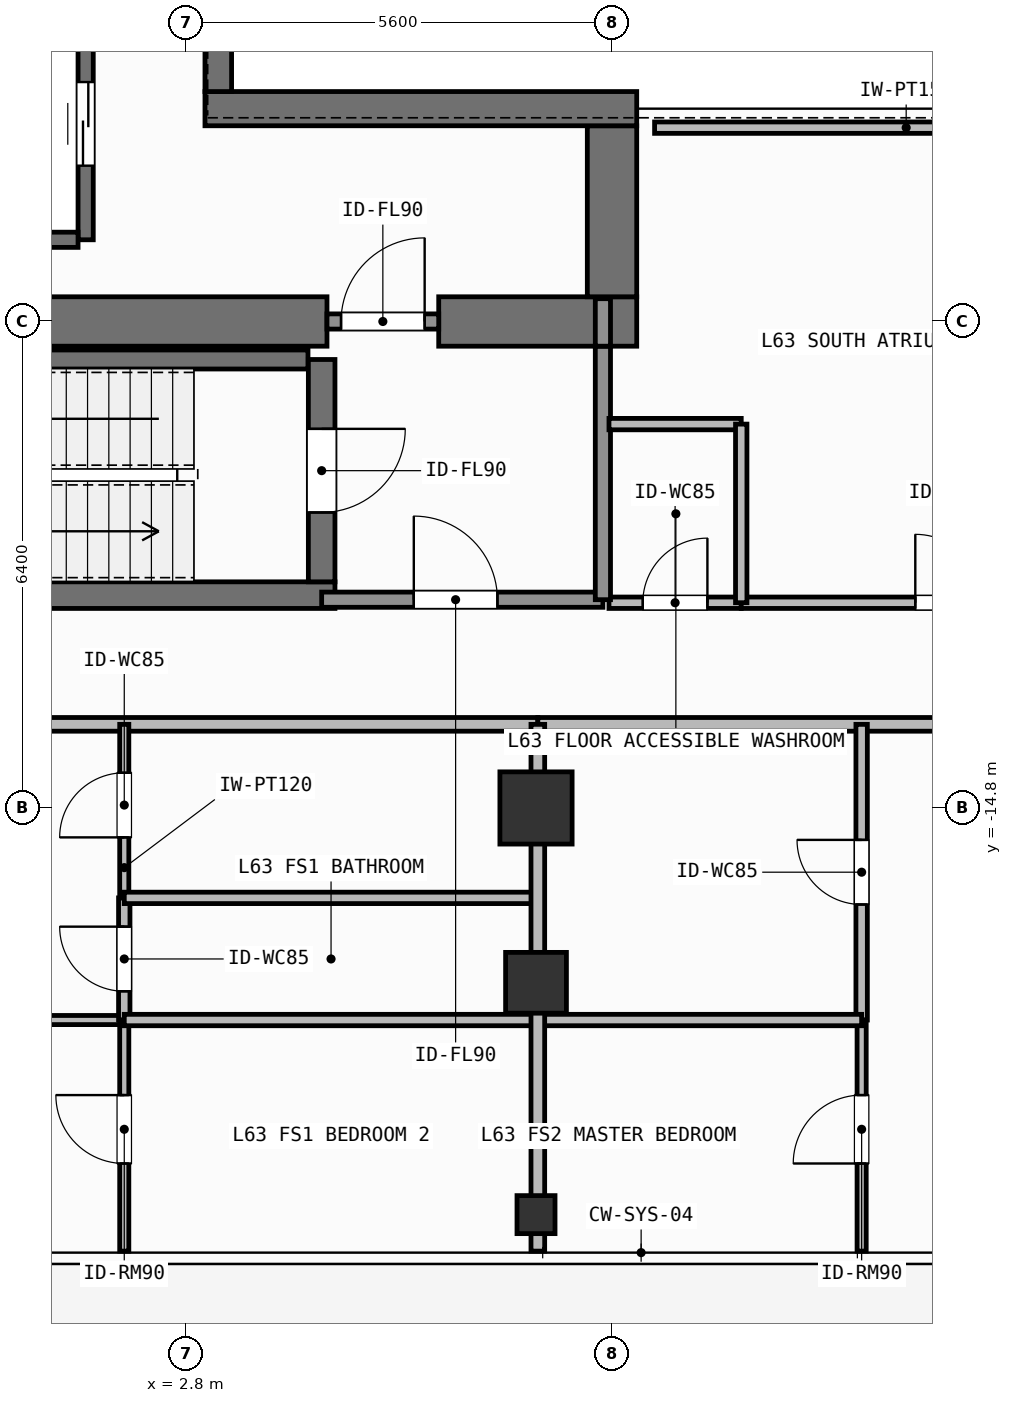
"""IFC4 building model, lengths in metres.
Left out: names, types, materials, properties, quantities, classifications, styles, units other than length and angle.
Written with IfcOpenShell. Run it as: python <this file> out.ifc"""

import sys

from ifc_helpers import new_model, si_unit, direction, frame, frame_2d, origin, origin_2d, place, context, subcontext, project, spatial, rectangle, hollow_rectangle, extrude, element, fill, save


model = new_model("IFC4")
c1 = context("Model", 3, precision=1e-05, world=origin(), true_north=direction((0.0, 1.0)))
c2 = subcontext(c1, "Body", "Model", "MODEL_VIEW")
j1 = project(units=[si_unit("LENGTHUNIT", "METRE"), si_unit("PLANEANGLEUNIT", "RADIAN")], contexts=[c1])
p1 = place(None, origin())
s1 = spatial("IfcSite", under=j1, at=p1, CompositionType="ELEMENT")
p2 = place(p1, origin())
s2 = spatial("IfcBuilding", under=s1, at=p2, CompositionType="ELEMENT")
p3 = place(p2, frame((0.0, 0.0, 258.6)))
s3 = spatial("IfcBuildingStorey", under=s2, at=p3, CompositionType="ELEMENT", Elevation=258.6)
p4 = place(p3, frame((-2.62, -8.4, 0.0), z_axis=(0.0, 0.0, 1.0), x_axis=(1.0, 0.0, 0.0)))
e1 = element("IfcWall", 1, at=p4, inside=s3, PredefinedType="SHEAR", context=c2, shape_type="SweptSolid", body=[
    extrude(rectangle(XDim=7.27, YDim=0.65, at=frame_2d((3.635, 0.0))), origin(), (0.0, 0.0, 1.0), 3.9),
])
p5 = place(p3, frame((6.12, -8.4, 0.0), z_axis=(0.0, 0.0, 1.0), x_axis=(1.0, 0.0, 0.0)))
e2 = element("IfcWall", 2, at=p5, inside=s3, PredefinedType="SHEAR", context=c2, shape_type="SweptSolid", body=[
    extrude(rectangle(XDim=2.605, YDim=0.65, at=frame_2d((1.302, 0.0))), origin(), (0.0, 0.0, 1.0), 3.9),
])
p6 = place(p3, frame((8.4, -8.075, 0.0), z_axis=(0.0, 0.0, 1.0), x_axis=(0.0, 1.0, 0.0)))
e3 = element("IfcWall", 3, at=p6, inside=s3, PredefinedType="SHEAR", context=c2, shape_type="SweptSolid", body=[
    extrude(rectangle(XDim=2.25, YDim=0.65, at=frame_2d((1.125, 0.0))), origin(), (0.0, 0.0, 1.0), 3.9),
])
p7 = place(p3, frame((3.045, -5.6, 0.0), z_axis=(0.0, 0.0, 1.0), x_axis=(1.0, 0.0, 0.0)))
e4 = element("IfcWall", 4, at=p7, inside=s3, PredefinedType="SHEAR", context=c2, shape_type="SweptSolid", body=[
    extrude(rectangle(XDim=5.68, YDim=0.45, at=frame_2d((2.84, 0.0))), origin(), (0.0, 0.0, 1.0), 3.9),
])
p8 = place(p3, frame((3.22, -5.375, 0.0), z_axis=(0.0, 0.0, 1.0), x_axis=(0.0, 1.0, 0.0)))
e5 = element("IfcWall", 5, at=p8, inside=s3, PredefinedType="SHEAR", context=c2, shape_type="SweptSolid", body=[
    extrude(rectangle(XDim=10.75, YDim=0.35, at=frame_2d((5.375, 0.0))), origin(), (0.0, 0.0, 1.0), 3.9),
])
p9 = place(p3, frame((-2.555, -12.0, 0.0), z_axis=(0.0, 0.0, 1.0), x_axis=(1.0, 0.0, 0.0)))
e6 = element("IfcWall", 6, at=p9, inside=s3, PredefinedType="SHEAR", context=c2, shape_type="SweptSolid", body=[
    extrude(rectangle(XDim=7.31, YDim=0.35, at=frame_2d((3.655, 0.0))), origin(), (0.0, 0.0, 1.0), 3.9),
])
p10 = place(p3, frame((-2.2, -8.9, 0.0), z_axis=(0.0, 0.0, 1.0), x_axis=(1.0, 0.0, 0.0)))
e7 = element("IfcWall", 7, at=p10, inside=s3, PredefinedType="SHEAR", context=c2, shape_type="SweptSolid", body=[
    extrude(rectangle(XDim=6.6, YDim=0.25, at=frame_2d((3.3, 0.0))), origin(), (0.0, 0.0, 1.0), 3.9),
])
p11 = place(p3, frame((4.58, -8.9, 0.0), z_axis=(0.0, 0.0, 1.0), x_axis=(0.0, -1.0, 0.0)))
e8 = element("IfcWall", 8, at=p11, inside=s3, PredefinedType="SHEAR", context=c2, shape_type="SweptSolid", body=[
    extrude(rectangle(XDim=2.925, YDim=0.35, at=frame_2d((1.462, 0.0))), origin(), (0.0, 0.0, 1.0), 3.9),
])
p12 = place(p11, frame((0.913, 0.0, 0.0)))
e9 = element("IfcOpeningElement", 9, at=p12, cuts=e8, PredefinedType="OPENING", context=c2, shape_type="SweptSolid", body=[
    extrude(rectangle(XDim=1.1, YDim=2.15, at=frame_2d((0.55, 1.075))), frame((0.0, 0.185, 0.0), z_axis=(0.0, -1.0, 0.0), x_axis=(1.0, 0.0, 0.0)), (0.0, 0.0, 1.0), 0.37),
])
p13 = place(p3, frame((7.4, -14.8, 0.0), z_axis=(0.0, 0.0, 1.0), x_axis=(1.0, 0.0, 0.0)))
e10 = element("IfcColumn", 10, at=p13, inside=s3, PredefinedType="COLUMN", context=c2, shape_type="SweptSolid", body=[
    extrude(rectangle(XDim=0.95, YDim=0.95, at=origin_2d()), origin(), (0.0, 0.0, 1.0), 3.9),
])
p14 = place(p3, frame((7.4, -17.1, 0.0), z_axis=(0.0, 0.0, 1.0), x_axis=(1.0, 0.0, 0.0)))
e11 = element("IfcColumn", 11, at=p14, inside=s3, PredefinedType="COLUMN", context=c2, shape_type="SweptSolid", body=[
    extrude(hollow_rectangle(XDim=0.8, YDim=0.8, WallThickness=0.036, at=origin_2d()), origin(), (0.0, 0.0, 1.0), 3.9),
])
p15 = place(p3, frame((7.4, -20.15, 0.0), z_axis=(0.0, 0.0, 1.0), x_axis=(1.0, 0.0, 0.0)))
e12 = element("IfcColumn", 12, at=p15, inside=s3, PredefinedType="COLUMN", context=c2, shape_type="SweptSolid", body=[
    extrude(hollow_rectangle(XDim=0.5, YDim=0.5, WallThickness=0.025, at=origin_2d()), origin(), (0.0, 0.0, 1.0), 3.9),
])
p16 = place(p3, frame((1.475, -7.325, 0.0), z_axis=(0.0, 0.0, 1.0), x_axis=(0.0, 1.0, 0.0)))
e13 = element("IfcWall", 13, at=p16, inside=s3, PredefinedType="SHEAR", context=c2, shape_type="SweptSolid", body=[
    extrude(rectangle(XDim=3.05, YDim=0.2, at=frame_2d((1.525, 0.0))), origin(), (0.0, 0.0, 1.0), 3.68),
])
p17 = place(p16, frame((0.975, 0.0, 0.0)))
e14 = element("IfcOpeningElement", 14, at=p17, cuts=e13, PredefinedType="OPENING", context=c2, shape_type="SweptSolid", body=[
    extrude(rectangle(XDim=1.1, YDim=2.2, at=frame_2d((0.55, 1.1))), frame((0.0, 0.11, 0.0), z_axis=(0.0, -1.0, 0.0), x_axis=(1.0, 0.0, 0.0)), (0.0, 0.0, 1.0), 0.22),
])
p18 = place(p3, frame((-0.975, -7.325, 0.0), z_axis=(0.0, 0.0, 1.0), x_axis=(1.0, 0.0, 0.0)))
e15 = element("IfcWall", 15, at=p18, inside=s3, PredefinedType="SHEAR", context=c2, shape_type="SweptSolid", body=[
    extrude(rectangle(XDim=2.35, YDim=0.2, at=frame_2d((1.175, 0.0))), origin(), (0.0, 0.0, 1.0), 3.68),
])
p19 = place(p3, frame((4.58, -12.06, 0.0), z_axis=(0.0, 0.0, 1.0), x_axis=(1.0, 0.0, 0.0)))
e16 = element("IfcWall", 16, at=p19, inside=s3, PredefinedType="SOLIDWALL", context=c2, shape_type="SweptSolid", body=[
    extrude(rectangle(XDim=3.7, YDim=0.2, at=frame_2d((1.85, 0.0))), origin(), (0.0, 0.0, 1.0), 3.68),
])
p20 = place(p19, frame((1.212, 0.0, 0.0)))
e17 = element("IfcOpeningElement", 17, at=p20, cuts=e16, PredefinedType="OPENING", context=c2, shape_type="SweptSolid", body=[
    extrude(rectangle(XDim=1.1, YDim=2.15, at=frame_2d((0.55, 1.075))), frame((0.0, 0.11, 0.0), z_axis=(0.0, -1.0, 0.0), x_axis=(1.0, 0.0, 0.0)), (0.0, 0.0, 1.0), 0.22),
])
p21 = place(p3, frame((4.65, -8.4, 0.0), z_axis=(0.0, 0.0, 1.0), x_axis=(1.0, 0.0, 0.0)))
e18 = element("IfcWall", 18, at=p21, inside=s3, PredefinedType="SOLIDWALL", context=c2, shape_type="SweptSolid", body=[
    extrude(rectangle(XDim=1.47, YDim=0.2, at=frame_2d((0.735, 0.0))), origin(), (0.0, 0.0, 1.0), 2.92),
])
p22 = place(p21, frame((0.185, 0.0, 0.0)))
e19 = element("IfcOpeningElement", 19, at=p22, cuts=e18, PredefinedType="OPENING", context=c2, shape_type="SweptSolid", body=[
    extrude(rectangle(XDim=1.1, YDim=2.15, at=frame_2d((0.55, 1.075))), frame((0.0, 0.11, 0.0), z_axis=(0.0, -1.0, 0.0), x_axis=(1.0, 0.0, 0.0)), (0.0, 0.0, 1.0), 0.22),
])
p23 = place(p3, frame((8.36, -12.1, 0.0), z_axis=(0.0, 0.0, 1.0), x_axis=(1.0, 0.0, 0.0)))
e20 = element("IfcWall", 20, at=p23, inside=s3, PredefinedType="PARTITIONING", context=c2, shape_type="SweptSolid", body=[
    extrude(rectangle(XDim=1.74, YDim=0.15, at=frame_2d((0.87, 0.0))), origin(), (0.0, 0.0, 1.0), 3.68),
])
p24 = place(p23, frame((0.445, 0.0, 0.0)))
e21 = element("IfcOpeningElement", 21, at=p24, cuts=e20, PredefinedType="OPENING", context=c2, shape_type="SweptSolid", body=[
    extrude(rectangle(XDim=0.85, YDim=2.1, at=frame_2d((0.425, 1.05))), frame((0.0, 0.085, 0.0), z_axis=(0.0, -1.0, 0.0), x_axis=(1.0, 0.0, 0.0)), (0.0, 0.0, 1.0), 0.17),
])
p25 = place(p3, frame((10.1, -12.1, 0.0), z_axis=(0.0, 0.0, 1.0), x_axis=(1.0, 0.0, 0.0)))
e22 = element("IfcWall", 22, at=p25, inside=s3, PredefinedType="PARTITIONING", context=c2, shape_type="SweptSolid", body=[
    extrude(rectangle(XDim=5.48, YDim=0.15, at=frame_2d((2.74, 0.0))), origin(), (0.0, 0.0, 1.0), 3.68),
])
p26 = place(p25, frame((2.29, 0.0, 0.0)))
e23 = element("IfcOpeningElement", 23, at=p26, cuts=e22, PredefinedType="OPENING", context=c2, shape_type="SweptSolid", body=[
    extrude(rectangle(XDim=0.9, YDim=2.1, at=frame_2d((0.45, 1.05))), frame((0.0, 0.085, 0.0), z_axis=(0.0, -1.0, 0.0), x_axis=(1.0, 0.0, 0.0)), (0.0, 0.0, 1.0), 0.17),
])
p27 = place(p3, frame((-13.72, -13.7, 0.0), z_axis=(0.0, 0.0, 1.0), x_axis=(1.0, 0.0, 0.0)))
e24 = element("IfcWall", 24, at=p27, inside=s3, PredefinedType="PARTITIONING", context=c2, shape_type="SweptSolid", body=[
    extrude(rectangle(XDim=21.144, YDim=0.18, at=frame_2d((10.572, 0.0))), origin(), (0.0, 0.0, 1.0), 3.68),
])
p28 = place(p27, frame((9.625, 0.0, 0.0)))
e25 = element("IfcOpeningElement", 25, at=p28, cuts=e24, PredefinedType="OPENING", context=c2, shape_type="SweptSolid", body=[
    extrude(rectangle(XDim=1.0, YDim=2.2, at=frame_2d((0.5, 1.1))), frame((0.0, 0.1, 0.0), z_axis=(0.0, -1.0, 0.0), x_axis=(1.0, 0.0, 0.0)), (0.0, 0.0, 1.0), 0.2),
])
p29 = place(p3, frame((-9.39, -17.59, 0.0), z_axis=(0.0, 0.0, 1.0), x_axis=(1.0, 0.0, 0.0)))
e26 = element("IfcWall", 26, at=p29, inside=s3, PredefinedType="PARTITIONING", context=c2, shape_type="SweptSolid", body=[
    extrude(rectangle(XDim=11.373, YDim=0.12, at=frame_2d((5.687, 0.0))), origin(), (0.0, 0.0, 1.0), 3.68),
])
p30 = place(p29, frame((5.147, 0.0, 0.0)))
e27 = element("IfcOpeningElement", 27, at=p30, cuts=e26, PredefinedType="OPENING", context=c2, shape_type="SweptSolid", body=[
    extrude(rectangle(XDim=0.9, YDim=2.1, at=frame_2d((0.45, 1.05))), frame((0.0, 0.07, 0.0), z_axis=(0.0, -1.0, 0.0), x_axis=(1.0, 0.0, 0.0)), (0.0, 0.0, 1.0), 0.14),
])
p31 = place(p3, frame((1.983, -17.59, 0.0), z_axis=(0.0, 0.0, 1.0), x_axis=(0.0, 1.0, 0.0)))
e28 = element("IfcWall", 28, at=p31, inside=s3, PredefinedType="PARTITIONING", context=c2, shape_type="SweptSolid", body=[
    extrude(rectangle(XDim=1.607, YDim=0.15, at=frame_2d((0.804, 0.0))), origin(), (0.0, 0.0, 1.0), 3.68),
])
p32 = place(p31, frame((0.378, 0.0, 0.0)))
e29 = element("IfcOpeningElement", 29, at=p32, cuts=e28, PredefinedType="OPENING", context=c2, shape_type="SweptSolid", body=[
    extrude(rectangle(XDim=0.85, YDim=2.1, at=frame_2d((0.425, 1.05))), frame((0.0, 0.085, 0.0), z_axis=(0.0, -1.0, 0.0), x_axis=(1.0, 0.0, 0.0)), (0.0, 0.0, 1.0), 0.17),
])
p33 = place(p3, frame((1.983, -15.983, 0.0), z_axis=(0.0, 0.0, 1.0), x_axis=(0.0, 1.0, 0.0)))
e30 = element("IfcWall", 30, at=p33, inside=s3, PredefinedType="PARTITIONING", context=c2, shape_type="SweptSolid", body=[
    extrude(rectangle(XDim=2.283, YDim=0.12, at=frame_2d((1.142, 0.0))), origin(), (0.0, 0.0, 1.0), 3.68),
])
p34 = place(p33, frame((0.796, 0.0, 0.0)))
e31 = element("IfcOpeningElement", 31, at=p34, cuts=e30, PredefinedType="OPENING", context=c2, shape_type="SweptSolid", body=[
    extrude(rectangle(XDim=0.85, YDim=2.1, at=frame_2d((0.425, 1.05))), frame((0.0, 0.07, 0.0), z_axis=(0.0, -1.0, 0.0), x_axis=(1.0, 0.0, 0.0)), (0.0, 0.0, 1.0), 0.14),
])
p35 = place(p3, frame((1.983, -20.63, 0.0), z_axis=(0.0, 0.0, 1.0), x_axis=(0.0, 1.0, 0.0)))
e32 = element("IfcWall", 32, at=p35, inside=s3, PredefinedType="PARTITIONING", context=c2, shape_type="SweptSolid", body=[
    extrude(rectangle(XDim=3.04, YDim=0.12, at=frame_2d((1.52, 0.0))), origin(), (0.0, 0.0, 1.0), 3.68),
])
p36 = place(p35, frame((1.153, 0.0, 0.0)))
e33 = element("IfcOpeningElement", 33, at=p36, cuts=e32, PredefinedType="OPENING", context=c2, shape_type="SweptSolid", body=[
    extrude(rectangle(XDim=0.9, YDim=2.1, at=frame_2d((0.45, 1.05))), frame((0.0, 0.07, 0.0), z_axis=(0.0, -1.0, 0.0), x_axis=(1.0, 0.0, 0.0)), (0.0, 0.0, 1.0), 0.14),
])
p37 = place(p3, frame((7.424, -13.7, 0.0), z_axis=(0.0, 0.0, 1.0), x_axis=(1.0, 0.0, 0.0)))
e34 = element("IfcWall", 34, at=p37, inside=s3, PredefinedType="PARTITIONING", context=c2, shape_type="SweptSolid", body=[
    extrude(rectangle(XDim=14.096, YDim=0.18, at=frame_2d((7.048, 0.0))), origin(), (0.0, 0.0, 1.0), 3.68),
])
p38 = place(p37, frame((5.738, 0.0, 0.0)))
e35 = element("IfcOpeningElement", 35, at=p38, cuts=e34, PredefinedType="OPENING", context=c2, shape_type="SweptSolid", body=[
    extrude(rectangle(XDim=1.0, YDim=2.2, at=frame_2d((0.5, 1.1))), frame((0.0, 0.1, 0.0), z_axis=(0.0, -1.0, 0.0), x_axis=(1.0, 0.0, 0.0)), (0.0, 0.0, 1.0), 0.2),
])
p39 = place(p3, frame((11.684, -17.59, 0.0), z_axis=(0.0, 0.0, 1.0), x_axis=(0.0, 1.0, 0.0)))
e36 = element("IfcWall", 36, at=p39, inside=s3, PredefinedType="PARTITIONING", context=c2, shape_type="SweptSolid", body=[
    extrude(rectangle(XDim=3.89, YDim=0.15, at=frame_2d((1.945, 0.0))), origin(), (0.0, 0.0, 1.0), 3.68),
])
p40 = place(p39, frame((1.52, 0.0, 0.0)))
e37 = element("IfcOpeningElement", 37, at=p40, cuts=e36, PredefinedType="OPENING", context=c2, shape_type="SweptSolid", body=[
    extrude(rectangle(XDim=0.85, YDim=2.1, at=frame_2d((0.425, 1.05))), frame((0.0, 0.085, 0.0), z_axis=(0.0, -1.0, 0.0), x_axis=(1.0, 0.0, 0.0)), (0.0, 0.0, 1.0), 0.17),
])
p41 = place(p3, frame((11.684, -20.63, 0.0), z_axis=(0.0, 0.0, 1.0), x_axis=(0.0, 1.0, 0.0)))
e38 = element("IfcWall", 38, at=p41, inside=s3, PredefinedType="PARTITIONING", context=c2, shape_type="SweptSolid", body=[
    extrude(rectangle(XDim=3.04, YDim=0.12, at=frame_2d((1.52, 0.0))), origin(), (0.0, 0.0, 1.0), 3.68),
])
p42 = place(p41, frame((1.153, 0.0, 0.0)))
e39 = element("IfcOpeningElement", 39, at=p42, cuts=e38, PredefinedType="OPENING", context=c2, shape_type="SweptSolid", body=[
    extrude(rectangle(XDim=0.9, YDim=2.1, at=frame_2d((0.45, 1.05))), frame((0.0, 0.07, 0.0), z_axis=(0.0, -1.0, 0.0), x_axis=(1.0, 0.0, 0.0)), (0.0, 0.0, 1.0), 0.14),
])
p43 = place(p3, frame((8.28, -12.06, 0.0), z_axis=(0.0, 0.0, 1.0), x_axis=(0.0, 1.0, 0.0)))
e40 = element("IfcWall", 40, at=p43, inside=s3, PredefinedType="SOLIDWALL", context=c2, shape_type="SweptSolid", body=[
    extrude(rectangle(XDim=3.335, YDim=0.2, at=frame_2d((1.667, 0.0))), origin(), (0.0, 0.0, 1.0), 3.68),
])
p44 = place(p3, frame((8.28, -8.725, 0.0), z_axis=(0.0, 0.0, 1.0), x_axis=(0.0, 1.0, 0.0)))
e41 = element("IfcWall", 41, at=p44, inside=s3, PredefinedType="SOLIDWALL", context=c2, shape_type="SweptSolid", body=[
    extrude(rectangle(XDim=0.625, YDim=0.2, at=frame_2d((0.312, 0.0))), origin(), (0.0, 0.0, 1.0), 3.68),
])
p45 = place(p3, frame((8.36, -9.75, 0.0), z_axis=(0.0, 0.0, 1.0), x_axis=(1.0, 0.0, 0.0)))
e42 = element("IfcWall", 42, at=p45, inside=s3, PredefinedType="PARTITIONING", context=c2, shape_type="SweptSolid", body=[
    extrude(rectangle(XDim=1.74, YDim=0.15, at=frame_2d((0.87, 0.0))), origin(), (0.0, 0.0, 1.0), 3.68),
])
p46 = place(p3, frame((10.1, -12.1, 0.0), z_axis=(0.0, 0.0, 1.0), x_axis=(0.0, 1.0, 0.0)))
e43 = element("IfcWall", 43, at=p46, inside=s3, PredefinedType="PARTITIONING", context=c2, shape_type="SweptSolid", body=[
    extrude(rectangle(XDim=2.35, YDim=0.15, at=frame_2d((1.175, 0.0))), origin(), (0.0, 0.0, 1.0), 3.68),
])
p47 = place(p3, frame((8.96, -5.85, 0.0), z_axis=(0.0, 0.0, 1.0), x_axis=(1.0, 0.0, 0.0)))
e44 = element("IfcWall", 44, at=p47, inside=s3, PredefinedType="PARTITIONING", context=c2, shape_type="SweptSolid", body=[
    extrude(rectangle(XDim=6.62, YDim=0.15, at=frame_2d((3.31, 0.0))), origin(), (0.0, 0.0, 1.0), 3.68),
])
for number, where, z_axis, x_axis in (
    (45, (1.983, -15.983, 0.0), (0.0, 0.0, 1.0), (1.0, 0.0, 0.0)),
    (46, (1.983, -17.59, 0.0), (0.0, 0.0, 1.0), (1.0, 0.0, 0.0)),
):
    element("IfcWall", number, at=place(p3, frame(where, z_axis=z_axis, x_axis=x_axis)), inside=s3, PredefinedType="PARTITIONING", context=c2, shape_type="SweptSolid", body=[
        extrude(rectangle(XDim=5.441, YDim=0.15, at=frame_2d((2.721, 0.0))), origin(), (0.0, 0.0, 1.0), 3.68),
    ])
p48 = place(p3, frame((7.424, -17.59, 0.0), z_axis=(0.0, 0.0, 1.0), x_axis=(1.0, 0.0, 0.0)))
e47 = element("IfcWall", 47, at=p48, inside=s3, PredefinedType="PARTITIONING", context=c2, shape_type="SweptSolid", body=[
    extrude(rectangle(XDim=4.26, YDim=0.15, at=frame_2d((2.13, 0.0))), origin(), (0.0, 0.0, 1.0), 3.68),
])
p49 = place(p3, frame((7.424, -20.63, 0.0), z_axis=(0.0, 0.0, 1.0), x_axis=(0.0, 1.0, 0.0)))
e48 = element("IfcWall", 48, at=p49, inside=s3, PredefinedType="PARTITIONING", context=c2, shape_type="SweptSolid", body=[
    extrude(rectangle(XDim=6.93, YDim=0.18, at=frame_2d((3.465, 0.0))), origin(), (0.0, 0.0, 1.0), 3.182),
])
p50 = place(p17, origin())
e49 = element("IfcDoor", 49, at=p50, inside=s3, OperationType="SLIDING_TO_LEFT", PredefinedType="DOOR", context=c2, shape_type="SweptSolid", body=[
    extrude(rectangle(XDim=1.1, YDim=2.2, at=frame_2d((0.55, 1.1))), frame((0.0, 0.025, 0.0), z_axis=(0.0, -1.0, 0.0), x_axis=(1.0, 0.0, 0.0)), (0.0, 0.0, 1.0), 0.05),
])
fill(e14, e49)
p51 = place(p12, origin())
e50 = element("IfcDoor", 50, at=p51, inside=s3, OperationType="SINGLE_SWING_LEFT", PredefinedType="DOOR", context=c2, shape_type="SweptSolid", body=[
    extrude(rectangle(XDim=1.1, YDim=2.15, at=frame_2d((0.55, 1.075))), frame((0.0, 0.025, 0.0), z_axis=(0.0, -1.0, 0.0), x_axis=(1.0, 0.0, 0.0)), (0.0, 0.0, 1.0), 0.05),
])
fill(e9, e50)
p52 = place(p20, origin())
e51 = element("IfcDoor", 51, at=p52, inside=s3, OperationType="SINGLE_SWING_LEFT", PredefinedType="DOOR", context=c2, shape_type="SweptSolid", body=[
    extrude(rectangle(XDim=1.1, YDim=2.15, at=frame_2d((0.55, 1.075))), frame((0.0, 0.025, 0.0), z_axis=(0.0, -1.0, 0.0), x_axis=(1.0, 0.0, 0.0)), (0.0, 0.0, 1.0), 0.05),
])
fill(e17, e51)
p53 = place(p22, origin())
e52 = element("IfcDoor", 52, at=p53, inside=s3, OperationType="SINGLE_SWING_RIGHT", PredefinedType="DOOR", context=c2, shape_type="SweptSolid", body=[
    extrude(rectangle(XDim=1.1, YDim=2.15, at=frame_2d((0.55, 1.075))), frame((0.0, 0.025, 0.0), z_axis=(0.0, -1.0, 0.0), x_axis=(1.0, 0.0, 0.0)), (0.0, 0.0, 1.0), 0.05),
])
fill(e19, e52)
p54 = place(p24, origin())
e53 = element("IfcDoor", 53, at=p54, inside=s3, OperationType="SINGLE_SWING_RIGHT", PredefinedType="DOOR", context=c2, shape_type="SweptSolid", body=[
    extrude(rectangle(XDim=0.85, YDim=2.1, at=frame_2d((0.425, 1.05))), frame((0.0, 0.025, 0.0), z_axis=(0.0, -1.0, 0.0), x_axis=(1.0, 0.0, 0.0)), (0.0, 0.0, 1.0), 0.05),
])
fill(e21, e53)
p55 = place(p26, origin())
e54 = element("IfcDoor", 54, at=p55, inside=s3, OperationType="SINGLE_SWING_LEFT", PredefinedType="DOOR", context=c2, shape_type="SweptSolid", body=[
    extrude(rectangle(XDim=0.9, YDim=2.1, at=frame_2d((0.45, 1.05))), frame((0.0, 0.025, 0.0), z_axis=(0.0, -1.0, 0.0), x_axis=(1.0, 0.0, 0.0)), (0.0, 0.0, 1.0), 0.05),
])
fill(e23, e54)
p56 = place(p32, origin())
e55 = element("IfcDoor", 55, at=p56, inside=s3, OperationType="SINGLE_SWING_RIGHT", PredefinedType="DOOR", context=c2, shape_type="SweptSolid", body=[
    extrude(rectangle(XDim=0.85, YDim=2.1, at=frame_2d((0.425, 1.05))), frame((0.0, 0.025, 0.0), z_axis=(0.0, -1.0, 0.0), x_axis=(1.0, 0.0, 0.0)), (0.0, 0.0, 1.0), 0.05),
])
fill(e29, e55)
p57 = place(p34, origin())
e56 = element("IfcDoor", 56, at=p57, inside=s3, OperationType="SINGLE_SWING_LEFT", PredefinedType="DOOR", context=c2, shape_type="SweptSolid", body=[
    extrude(rectangle(XDim=0.85, YDim=2.1, at=frame_2d((0.425, 1.05))), frame((0.0, 0.025, 0.0), z_axis=(0.0, -1.0, 0.0), x_axis=(1.0, 0.0, 0.0)), (0.0, 0.0, 1.0), 0.05),
])
fill(e31, e56)
p58 = place(p36, origin())
e57 = element("IfcDoor", 57, at=p58, inside=s3, OperationType="SINGLE_SWING_RIGHT", PredefinedType="DOOR", context=c2, shape_type="SweptSolid", body=[
    extrude(rectangle(XDim=0.9, YDim=2.1, at=frame_2d((0.45, 1.05))), frame((0.0, 0.025, 0.0), z_axis=(0.0, -1.0, 0.0), x_axis=(1.0, 0.0, 0.0)), (0.0, 0.0, 1.0), 0.05),
])
fill(e33, e57)
p59 = place(p40, origin())
e58 = element("IfcDoor", 58, at=p59, inside=s3, OperationType="SINGLE_SWING_RIGHT", PredefinedType="DOOR", context=c2, shape_type="SweptSolid", body=[
    extrude(rectangle(XDim=0.85, YDim=2.1, at=frame_2d((0.425, 1.05))), frame((0.0, 0.025, 0.0), z_axis=(0.0, -1.0, 0.0), x_axis=(1.0, 0.0, 0.0)), (0.0, 0.0, 1.0), 0.05),
])
fill(e37, e58)
p60 = place(p42, origin())
e59 = element("IfcDoor", 59, at=p60, inside=s3, OperationType="SINGLE_SWING_LEFT", PredefinedType="DOOR", context=c2, shape_type="SweptSolid", body=[
    extrude(rectangle(XDim=0.9, YDim=2.1, at=frame_2d((0.45, 1.05))), frame((0.0, 0.025, 0.0), z_axis=(0.0, -1.0, 0.0), x_axis=(1.0, 0.0, 0.0)), (0.0, 0.0, 1.0), 0.05),
])
fill(e39, e59)
save(model, sys.argv[1])
